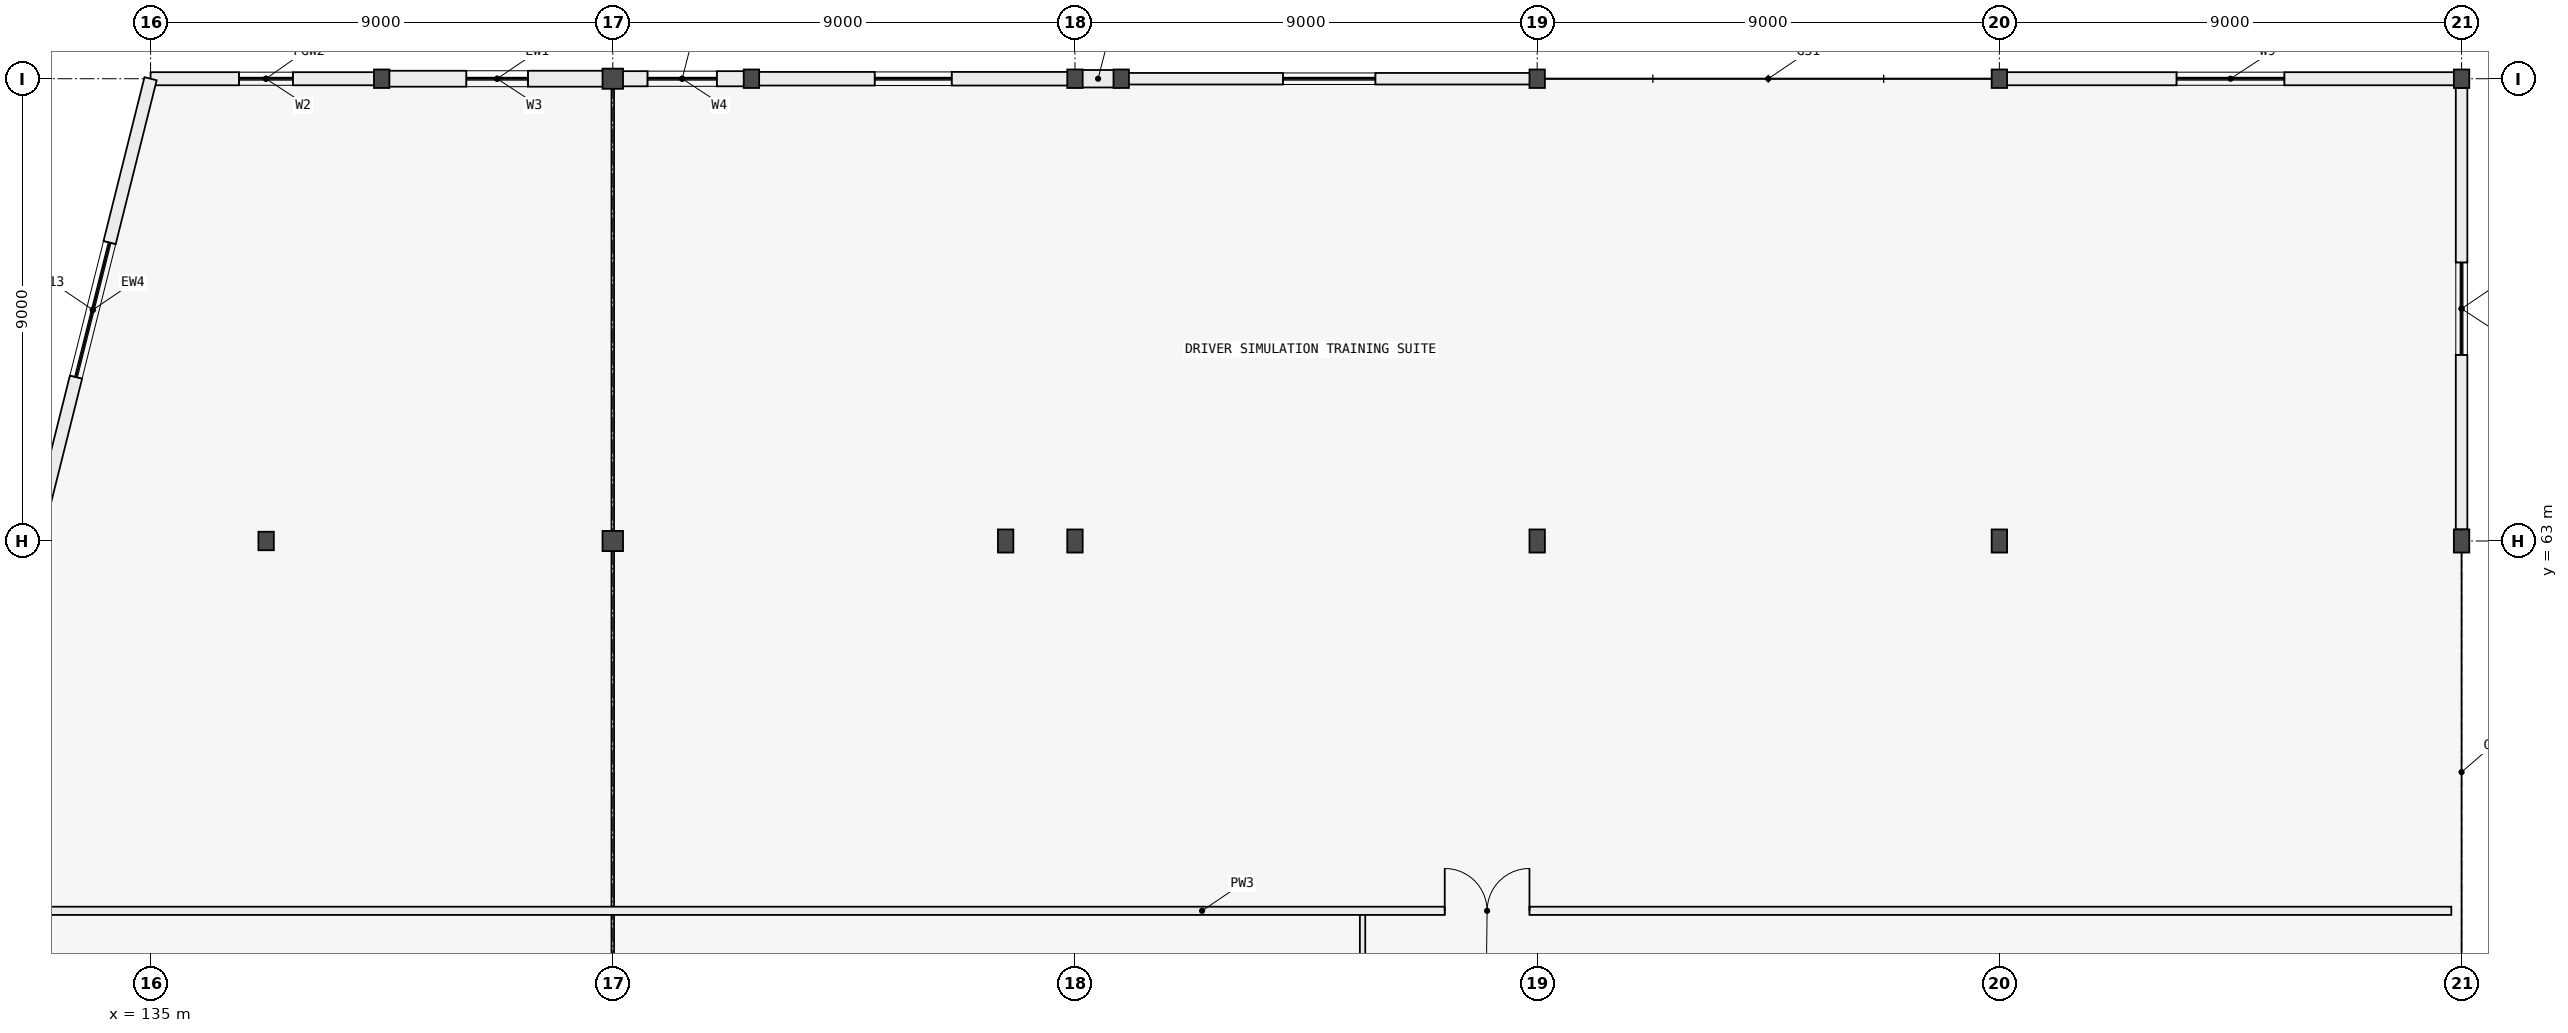
"""IFC4 building model, lengths in metres.
Left out: names, types, materials, properties, quantities, classifications, styles, units other than length and angle.
Written with IfcOpenShell. Run it as: python <this file> out.ifc"""

import sys

from ifc_helpers import new_model, si_unit, direction, frame, frame_2d, origin, origin_2d, place, context, subcontext, project, spatial, rectangle, i_section, extrude, element, fill, save


model = new_model("IFC4")
c1 = context("Model", 3, precision=1e-05, world=origin(), true_north=direction((0.0, 1.0)))
c2 = subcontext(c1, "Body", "Model", "MODEL_VIEW")
j1 = project(units=[si_unit("LENGTHUNIT", "METRE"), si_unit("PLANEANGLEUNIT", "RADIAN")], contexts=[c1])
p1 = place(None, origin())
s1 = spatial("IfcSite", under=j1, at=p1, CompositionType="ELEMENT")
p2 = place(p1, origin())
s2 = spatial("IfcBuilding", under=s1, at=p2, CompositionType="ELEMENT")
p3 = place(p2, frame((0.0, 0.0, 8.4)))
s3 = spatial("IfcBuildingStorey", under=s2, at=p3, CompositionType="ELEMENT", Elevation=8.4)
p4 = place(p3, frame((137.25, 63.0, 0.0), z_axis=(0.0, 0.0, 1.0), x_axis=(1.0, 0.0, 0.0)))
e1 = element("IfcColumn", 1, at=p4, inside=s3, PredefinedType="COLUMN", context=c2, shape_type="SweptSolid", body=[
    extrude(i_section(OverallWidth=0.3, OverallDepth=0.36, WebThickness=0.012, FlangeThickness=0.022, FilletRadius=0.027, at=origin_2d()), origin(), (0.0, 0.0, 1.0), 4.2),
])
p5 = place(p3, frame((144.0, 63.0, 0.0), z_axis=(0.0, 0.0, 1.0), x_axis=(1.0, 0.0, 0.0)))
e2 = element("IfcColumn", 2, at=p5, inside=s3, PredefinedType="COLUMN", context=c2, shape_type="SweptSolid", body=[
    extrude(i_section(OverallWidth=0.399, OverallDepth=0.393, WebThickness=0.018, FlangeThickness=0.028, FilletRadius=0.015, at=origin_2d()), origin(), (0.0, 0.0, 1.0), 4.2),
])
for number, where, z_axis, x_axis in (
    (3, (151.65, 63.0, 0.0), (0.0, 0.0, 1.0), (1.0, 0.0, 0.0)),
    (4, (153.0, 63.0, 0.0), (0.0, 0.0, 1.0), (1.0, 0.0, 0.0)),
    (5, (162.0, 63.0, 0.0), (0.0, 0.0, 1.0), (1.0, 0.0, 0.0)),
    (6, (171.0, 63.0, 0.0), (0.0, 0.0, 1.0), (1.0, 0.0, 0.0)),
    (7, (180.0, 63.0, 0.0), (0.0, 0.0, 1.0), (1.0, 0.0, 0.0)),
):
    element("IfcColumn", number, at=place(p3, frame(where, z_axis=z_axis, x_axis=x_axis)), inside=s3, PredefinedType="COLUMN", context=c2, shape_type="SweptSolid", body=[
        extrude(i_section(OverallWidth=0.3, OverallDepth=0.45, WebThickness=0.014, FlangeThickness=0.026, FilletRadius=0.027, at=origin_2d()), origin(), (0.0, 0.0, 1.0), 4.2),
    ])
p6 = place(p3, frame((139.5, 72.0, 0.0), z_axis=(0.0, 0.0, 1.0), x_axis=(1.0, 0.0, 0.0)))
e8 = element("IfcColumn", 8, at=p6, inside=s3, PredefinedType="COLUMN", context=c2, shape_type="SweptSolid", body=[
    extrude(i_section(OverallWidth=0.3, OverallDepth=0.36, WebThickness=0.012, FlangeThickness=0.022, FilletRadius=0.027, at=origin_2d()), origin(), (0.0, 0.0, 1.0), 4.2),
])
p7 = place(p3, frame((144.0, 72.0, 0.0), z_axis=(0.0, 0.0, 1.0), x_axis=(1.0, 0.0, 0.0)))
e9 = element("IfcColumn", 9, at=p7, inside=s3, PredefinedType="COLUMN", context=c2, shape_type="SweptSolid", body=[
    extrude(i_section(OverallWidth=0.399, OverallDepth=0.393, WebThickness=0.018, FlangeThickness=0.028, FilletRadius=0.015, at=origin_2d()), origin(), (0.0, 0.0, 1.0), 4.2),
])
for number, where, z_axis, x_axis in (
    (10, (146.7, 72.0, 0.0), (0.0, 0.0, 1.0), (1.0, 0.0, 0.0)),
    (11, (153.0, 72.0, 0.0), (0.0, 0.0, 1.0), (1.0, 0.0, 0.0)),
    (12, (153.9, 72.0, 0.0), (0.0, 0.0, 1.0), (1.0, 0.0, 0.0)),
    (13, (162.0, 72.0, 0.0), (0.0, 0.0, 1.0), (1.0, 0.0, 0.0)),
    (14, (171.0, 72.0, 0.0), (0.0, 0.0, 1.0), (1.0, 0.0, 0.0)),
    (15, (180.0, 72.0, 0.0), (0.0, 0.0, 1.0), (1.0, 0.0, 0.0)),
):
    element("IfcColumn", number, at=place(p3, frame(where, z_axis=z_axis, x_axis=x_axis)), inside=s3, PredefinedType="COLUMN", context=c2, shape_type="SweptSolid", body=[
        extrude(i_section(OverallWidth=0.3, OverallDepth=0.36, WebThickness=0.012, FlangeThickness=0.022, FilletRadius=0.027, at=origin_2d()), origin(), (0.0, 0.0, 1.0), 4.2),
    ])
p8 = place(p3, frame((180.0, 63.225, 0.0), z_axis=(0.0, 0.0, 1.0), x_axis=(0.0, 1.0, 0.0)))
e16 = element("IfcWall", 16, at=p8, inside=s3, PredefinedType="STANDARD", context=c2, shape_type="SweptSolid", body=[
    extrude(rectangle(XDim=8.595, YDim=0.225, at=frame_2d((4.297, 0.0))), origin(), (0.0, 0.0, 1.0), 3.61),
])
p9 = place(p8, frame((3.397, 0.0, 0.95)))
e17 = element("IfcOpeningElement", 17, at=p9, cuts=e16, PredefinedType="OPENING", context=c2, shape_type="SweptSolid", body=[
    extrude(rectangle(XDim=1.8, YDim=1.6, at=frame_2d((0.9, 0.8))), frame((0.0, 0.123, 0.0), z_axis=(0.0, -1.0, 0.0), x_axis=(1.0, 0.0, 0.0)), (0.0, 0.0, 1.0), 0.245),
])
p10 = place(p3, frame((135.0, 72.0, 0.0), z_axis=(0.0, 0.0, 1.0), x_axis=(1.0, 0.0, 0.0)))
e18 = element("IfcWall", 18, at=p10, inside=s3, PredefinedType="POLYGONAL", context=c2, shape_type="SweptSolid", body=[
    extrude(rectangle(XDim=4.494, YDim=0.255, at=frame_2d((2.247, 0.0))), origin(), (0.0, 0.0, 1.0), 3.64),
])
p11 = place(p10, frame((1.722, 0.0, 0.95)))
e19 = element("IfcOpeningElement", 19, at=p11, cuts=e18, PredefinedType="OPENING", context=c2, shape_type="SweptSolid", body=[
    extrude(rectangle(XDim=1.05, YDim=1.25, at=frame_2d((0.525, 0.625))), frame((0.0, 0.137, 0.0), z_axis=(0.0, -1.0, 0.0), x_axis=(1.0, 0.0, 0.0)), (0.0, 0.0, 1.0), 0.275),
])
p12 = place(p3, frame((139.506, 72.0, 0.0), z_axis=(0.0, 0.0, 1.0), x_axis=(1.0, 0.0, 0.0)))
e20 = element("IfcWall", 20, at=p12, inside=s3, PredefinedType="STANDARD", context=c2, shape_type="SweptSolid", body=[
    extrude(rectangle(XDim=4.485, YDim=0.31, at=frame_2d((2.243, 0.0))), origin(), (0.0, 0.0, 1.0), 3.64),
])
p13 = place(p12, frame((1.643, 0.0, 0.95)))
e21 = element("IfcOpeningElement", 21, at=p13, cuts=e20, PredefinedType="OPENING", context=c2, shape_type="SweptSolid", body=[
    extrude(rectangle(XDim=1.2, YDim=1.35, at=frame_2d((0.6, 0.675))), frame((0.0, 0.165, 0.0), z_axis=(0.0, -1.0, 0.0), x_axis=(1.0, 0.0, 0.0)), (0.0, 0.0, 1.0), 0.33),
])
p14 = place(p3, frame((144.009, 72.0, 0.0), z_axis=(0.0, 0.0, 1.0), x_axis=(1.0, 0.0, 0.0)))
e22 = element("IfcWall", 22, at=p14, inside=s3, PredefinedType="STANDARD", context=c2, shape_type="SweptSolid", body=[
    extrude(rectangle(XDim=2.685, YDim=0.295, at=frame_2d((1.342, 0.0))), origin(), (0.0, 0.0, 1.0), 3.64),
])
p15 = place(p14, frame((0.667, 0.0, 0.95)))
e23 = element("IfcOpeningElement", 23, at=p15, cuts=e22, PredefinedType="OPENING", context=c2, shape_type="SweptSolid", body=[
    extrude(rectangle(XDim=1.35, YDim=1.4, at=frame_2d((0.675, 0.7))), frame((0.0, 0.157, 0.0), z_axis=(0.0, -1.0, 0.0), x_axis=(1.0, 0.0, 0.0)), (0.0, 0.0, 1.0), 0.315),
])
p16 = place(p3, frame((146.706, 72.0, 0.0), z_axis=(0.0, 0.0, 1.0), x_axis=(1.0, 0.0, 0.0)))
e24 = element("IfcWall", 24, at=p16, inside=s3, PredefinedType="STANDARD", context=c2, shape_type="SweptSolid", body=[
    extrude(rectangle(XDim=6.288, YDim=0.265, at=frame_2d((3.144, 0.0))), origin(), (0.0, 0.0, 1.0), 3.64),
])
p17 = place(p16, frame((2.394, 0.0, 0.95)))
e25 = element("IfcOpeningElement", 25, at=p17, cuts=e24, PredefinedType="OPENING", context=c2, shape_type="SweptSolid", body=[
    extrude(rectangle(XDim=1.5, YDim=1.5, at=frame_2d((0.75, 0.75))), frame((0.0, 0.143, 0.0), z_axis=(0.0, -1.0, 0.0), x_axis=(1.0, 0.0, 0.0)), (0.0, 0.0, 1.0), 0.285),
])
p18 = place(p3, frame((153.006, 72.0, 0.0), z_axis=(0.0, 0.0, 1.0), x_axis=(1.0, 0.0, 0.0)))
e26 = element("IfcWall", 26, at=p18, inside=s3, PredefinedType="STANDARD", context=c2, shape_type="SweptSolid", body=[
    extrude(rectangle(XDim=0.888, YDim=0.34, at=frame_2d((0.444, 0.0))), origin(), (0.0, 0.0, 1.0), 3.64),
])
p19 = place(p3, frame((153.906, 72.0, 0.0), z_axis=(0.0, 0.0, 1.0), x_axis=(1.0, 0.0, 0.0)))
e27 = element("IfcWall", 27, at=p19, inside=s3, PredefinedType="STANDARD", context=c2, shape_type="SweptSolid", body=[
    extrude(rectangle(XDim=8.088, YDim=0.225, at=frame_2d((4.044, 0.0))), origin(), (0.0, 0.0, 1.0), 3.61),
])
p20 = place(p19, frame((3.144, 0.0, 0.95)))
e28 = element("IfcOpeningElement", 28, at=p20, cuts=e27, PredefinedType="OPENING", context=c2, shape_type="SweptSolid", body=[
    extrude(rectangle(XDim=1.8, YDim=1.6, at=frame_2d((0.9, 0.8))), frame((0.0, 0.123, 0.0), z_axis=(0.0, -1.0, 0.0), x_axis=(1.0, 0.0, 0.0)), (0.0, 0.0, 1.0), 0.245),
])
p21 = place(p3, frame((171.006, 72.0, 0.0), z_axis=(0.0, 0.0, 1.0), x_axis=(1.0, 0.0, 0.0)))
e29 = element("IfcWall", 29, at=p21, inside=s3, PredefinedType="POLYGONAL", context=c2, shape_type="SweptSolid", body=[
    extrude(rectangle(XDim=8.988, YDim=0.255, at=frame_2d((4.494, 0.0))), origin(), (0.0, 0.0, 1.0), 3.61),
])
p22 = place(p21, frame((3.444, 0.0, 0.95)))
e30 = element("IfcOpeningElement", 30, at=p22, cuts=e29, PredefinedType="OPENING", context=c2, shape_type="SweptSolid", body=[
    extrude(rectangle(XDim=2.1, YDim=1.7, at=frame_2d((1.05, 0.85))), frame((0.0, 0.137, 0.0), z_axis=(0.0, -1.0, 0.0), x_axis=(1.0, 0.0, 0.0)), (0.0, 0.0, 1.0), 0.275),
])
p23 = place(p3, frame((132.75, 63.0, 0.0), z_axis=(0.0, 0.0, 1.0), x_axis=(0.242535625036, 0.970142500145, 0.0)))
e31 = element("IfcWall", 31, at=p23, inside=s3, PredefinedType="STANDARD", context=c2, shape_type="SweptSolid", body=[
    extrude(rectangle(XDim=9.277, YDim=0.245, at=frame_2d((4.639, 0.0))), origin(), (0.0, 0.0, 1.0), 3.935),
])
p24 = place(p23, frame((3.289, 0.0, 0.95)))
e32 = element("IfcOpeningElement", 32, at=p24, cuts=e31, PredefinedType="OPENING", context=c2, shape_type="SweptSolid", body=[
    extrude(rectangle(XDim=2.7, YDim=1.6, at=frame_2d((1.35, 0.8))), frame((0.0, 0.133, 0.0), z_axis=(0.0, -1.0, 0.0), x_axis=(1.0, 0.0, 0.0)), (0.0, 0.0, 1.0), 0.265),
])
p25 = place(p3, frame((158.6, 36.2, 0.0), z_axis=(0.0, 0.0, 1.0), x_axis=(0.0, 1.0, 0.0)))
e33 = element("IfcWall", 33, at=p25, inside=s3, PredefinedType="MOVABLE", context=c2, shape_type="SweptSolid", body=[
    extrude(rectangle(XDim=19.6, YDim=0.105, at=frame_2d((9.8, 0.0))), origin(), (0.0, 0.0, 1.0), 3.64),
])
p26 = place(p25, frame((9.2, 0.0, 0.0)))
e34 = element("IfcOpeningElement", 34, at=p26, cuts=e33, PredefinedType="OPENING", context=c2, shape_type="SweptSolid", body=[
    extrude(rectangle(XDim=1.45, YDim=2.22, at=frame_2d((0.725, 1.11))), frame((0.0, 0.062, 0.0), z_axis=(0.0, -1.0, 0.0), x_axis=(1.0, 0.0, 0.0)), (0.0, 0.0, 1.0), 0.125),
])
p27 = place(p3, frame((131.15, 55.8, 0.0), z_axis=(0.0, 0.0, 1.0), x_axis=(1.0, 0.0, 0.0)))
e35 = element("IfcWall", 35, at=p27, inside=s3, PredefinedType="PARTITIONING", context=c2, shape_type="SweptSolid", body=[
    extrude(rectangle(XDim=48.65, YDim=0.16, at=frame_2d((24.325, 0.0))), origin(), (0.0, 0.0, 1.0), 3.935),
])
p28 = place(p27, frame((29.05, 0.0, 0.0)))
e36 = element("IfcOpeningElement", 36, at=p28, cuts=e35, PredefinedType="OPENING", context=c2, shape_type="SweptSolid", body=[
    extrude(rectangle(XDim=1.65, YDim=2.25, at=frame_2d((0.825, 1.125))), frame((0.0, 0.09, 0.0), z_axis=(0.0, -1.0, 0.0), x_axis=(1.0, 0.0, 0.0)), (0.0, 0.0, 1.0), 0.18),
])
p29 = place(p9, origin())
e37 = element("IfcWindow", 37, at=p29, inside=s3, PartitioningType="SINGLE_PANEL", PredefinedType="WINDOW", context=c2, shape_type="SweptSolid", body=[
    extrude(rectangle(XDim=1.8, YDim=1.6, at=frame_2d((0.9, 0.8))), frame((0.0, 0.03, 0.0), z_axis=(0.0, -1.0, 0.0), x_axis=(1.0, 0.0, 0.0)), (0.0, 0.0, 1.0), 0.06),
])
fill(e17, e37)
p30 = place(p11, origin())
e38 = element("IfcWindow", 38, at=p30, inside=s3, PartitioningType="SINGLE_PANEL", PredefinedType="WINDOW", context=c2, shape_type="SweptSolid", body=[
    extrude(rectangle(XDim=1.05, YDim=1.25, at=frame_2d((0.525, 0.625))), frame((0.0, 0.03, 0.0), z_axis=(0.0, -1.0, 0.0), x_axis=(1.0, 0.0, 0.0)), (0.0, 0.0, 1.0), 0.06),
])
fill(e19, e38)
p31 = place(p13, origin())
e39 = element("IfcWindow", 39, at=p31, inside=s3, PartitioningType="SINGLE_PANEL", PredefinedType="WINDOW", context=c2, shape_type="SweptSolid", body=[
    extrude(rectangle(XDim=1.2, YDim=1.35, at=frame_2d((0.6, 0.675))), frame((0.0, 0.03, 0.0), z_axis=(0.0, -1.0, 0.0), x_axis=(1.0, 0.0, 0.0)), (0.0, 0.0, 1.0), 0.06),
])
fill(e21, e39)
p32 = place(p15, origin())
e40 = element("IfcWindow", 40, at=p32, inside=s3, PartitioningType="SINGLE_PANEL", PredefinedType="WINDOW", context=c2, shape_type="SweptSolid", body=[
    extrude(rectangle(XDim=1.35, YDim=1.4, at=frame_2d((0.675, 0.7))), frame((0.0, 0.03, 0.0), z_axis=(0.0, -1.0, 0.0), x_axis=(1.0, 0.0, 0.0)), (0.0, 0.0, 1.0), 0.06),
])
fill(e23, e40)
p33 = place(p17, origin())
e41 = element("IfcWindow", 41, at=p33, inside=s3, PartitioningType="SINGLE_PANEL", PredefinedType="WINDOW", context=c2, shape_type="SweptSolid", body=[
    extrude(rectangle(XDim=1.5, YDim=1.5, at=frame_2d((0.75, 0.75))), frame((0.0, 0.03, 0.0), z_axis=(0.0, -1.0, 0.0), x_axis=(1.0, 0.0, 0.0)), (0.0, 0.0, 1.0), 0.06),
])
fill(e25, e41)
p34 = place(p20, origin())
e42 = element("IfcWindow", 42, at=p34, inside=s3, PartitioningType="SINGLE_PANEL", PredefinedType="WINDOW", context=c2, shape_type="SweptSolid", body=[
    extrude(rectangle(XDim=1.8, YDim=1.6, at=frame_2d((0.9, 0.8))), frame((0.0, 0.03, 0.0), z_axis=(0.0, -1.0, 0.0), x_axis=(1.0, 0.0, 0.0)), (0.0, 0.0, 1.0), 0.06),
])
fill(e28, e42)
p35 = place(p22, origin())
e43 = element("IfcWindow", 43, at=p35, inside=s3, PartitioningType="SINGLE_PANEL", PredefinedType="WINDOW", context=c2, shape_type="SweptSolid", body=[
    extrude(rectangle(XDim=2.1, YDim=1.7, at=frame_2d((1.05, 0.85))), frame((0.0, 0.03, 0.0), z_axis=(0.0, -1.0, 0.0), x_axis=(1.0, 0.0, 0.0)), (0.0, 0.0, 1.0), 0.06),
])
fill(e30, e43)
p36 = place(p24, origin())
e44 = element("IfcWindow", 44, at=p36, inside=s3, PartitioningType="SINGLE_PANEL", PredefinedType="WINDOW", context=c2, shape_type="SweptSolid", body=[
    extrude(rectangle(XDim=2.7, YDim=1.6, at=frame_2d((1.35, 0.8))), frame((0.0, 0.03, 0.0), z_axis=(0.0, -1.0, 0.0), x_axis=(1.0, 0.0, 0.0)), (0.0, 0.0, 1.0), 0.06),
])
fill(e32, e44)
p37 = place(p28, origin())
e45 = element("IfcDoor", 45, at=p37, inside=s3, OperationType="DOUBLE_DOOR_SINGLE_SWING", PredefinedType="DOOR", context=c2, shape_type="SweptSolid", body=[
    extrude(rectangle(XDim=1.65, YDim=2.25, at=frame_2d((0.825, 1.125))), frame((0.0, 0.025, 0.0), z_axis=(0.0, -1.0, 0.0), x_axis=(1.0, 0.0, 0.0)), (0.0, 0.0, 1.0), 0.05),
])
fill(e36, e45)
save(model, sys.argv[1])
